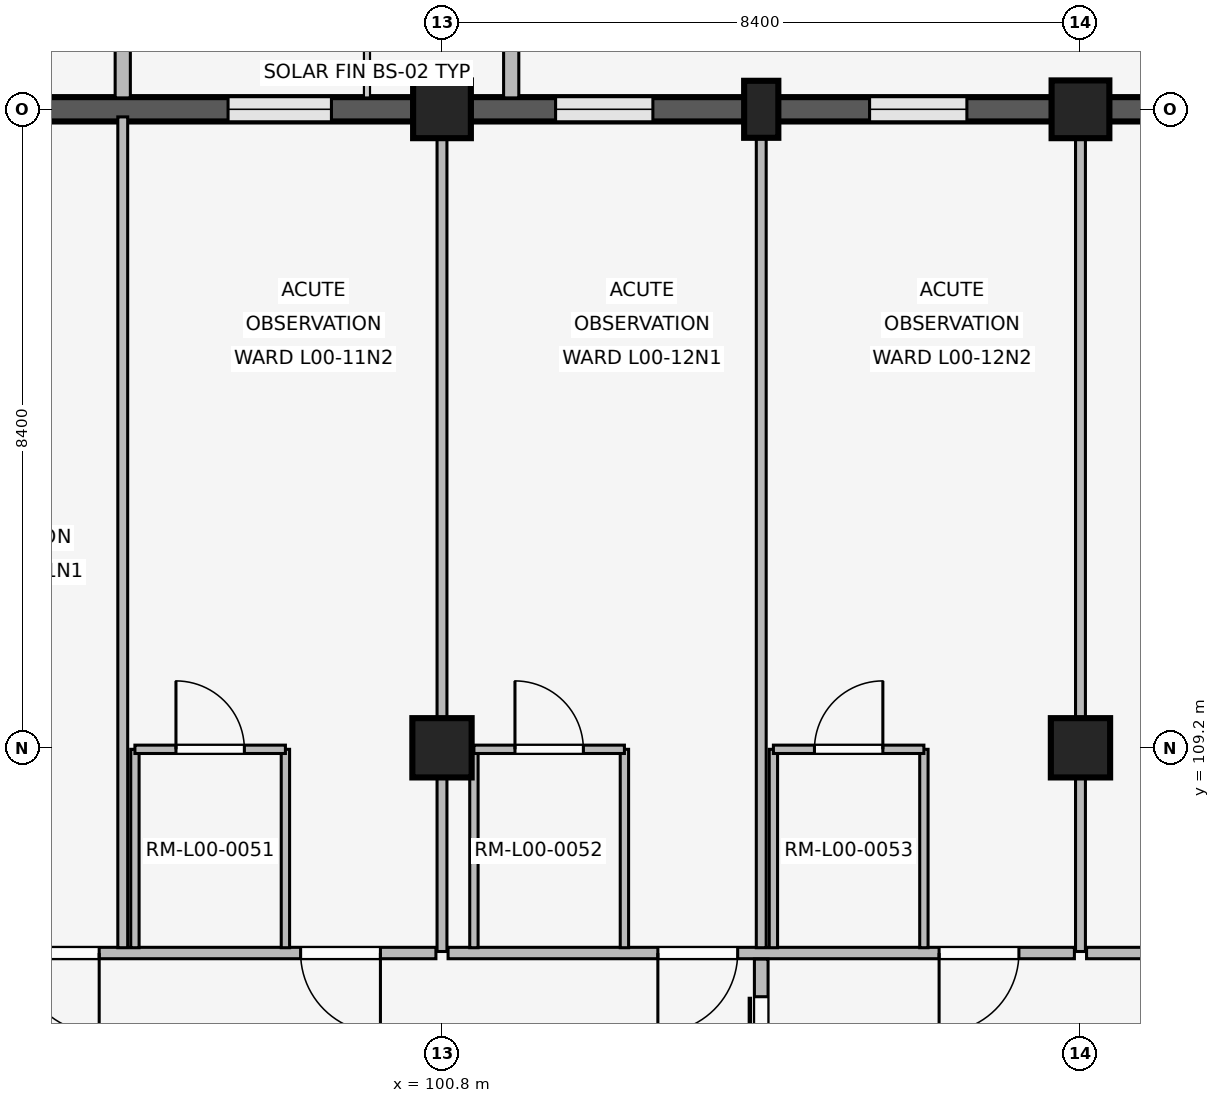
"""IFC4 building model, lengths in metres.
Left out: names, types, materials, properties, quantities, classifications, styles, units other than length and angle.
Written with IfcOpenShell. Run it as: python <this file> out.ifc"""

import sys

from ifc_helpers import new_model, si_unit, direction, frame, frame_2d, origin, origin_2d, place, context, subcontext, project, spatial, rectangle, extrude, element, fill, save


model = new_model("IFC4")
c1 = context("Model", 3, precision=1e-05, world=origin(), true_north=direction((0.0, 1.0)))
c2 = subcontext(c1, "Body", "Model", "MODEL_VIEW")
j1 = project(units=[si_unit("LENGTHUNIT", "METRE"), si_unit("PLANEANGLEUNIT", "RADIAN")], contexts=[c1])
p1 = place(None, origin())
s1 = spatial("IfcSite", under=j1, at=p1, CompositionType="ELEMENT")
p2 = place(p1, origin())
s2 = spatial("IfcBuilding", under=s1, at=p2, CompositionType="ELEMENT")
p3 = place(p2, origin())
s3 = spatial("IfcBuildingStorey", under=s2, at=p3, CompositionType="ELEMENT", Elevation=0.0)
p4 = place(p3, frame((100.8, 109.2, 0.0), z_axis=(0.0, 0.0, 1.0), x_axis=(1.0, 0.0, 0.0)))
e1 = element("IfcColumn", 1, at=p4, inside=s3, PredefinedType="COLUMN", context=c2, shape_type="SweptSolid", body=[
    extrude(rectangle(XDim=0.78, YDim=0.78, at=origin_2d()), origin(), (0.0, 0.0, 1.0), 4.8),
])
p5 = place(p3, frame((100.8, 117.6, 0.0), z_axis=(0.0, 0.0, 1.0), x_axis=(1.0, 0.0, 0.0)))
e2 = element("IfcColumn", 2, at=p5, inside=s3, PredefinedType="COLUMN", context=c2, shape_type="SweptSolid", body=[
    extrude(rectangle(XDim=0.76, YDim=0.76, at=origin_2d()), origin(), (0.0, 0.0, 1.0), 4.8),
])
p6 = place(p3, frame((109.2, 109.2, 0.0), z_axis=(0.0, 0.0, 1.0), x_axis=(1.0, 0.0, 0.0)))
e3 = element("IfcColumn", 3, at=p6, inside=s3, PredefinedType="COLUMN", context=c2, shape_type="SweptSolid", body=[
    extrude(rectangle(XDim=0.78, YDim=0.78, at=origin_2d()), origin(), (0.0, 0.0, 1.0), 4.8),
])
p7 = place(p3, frame((109.2, 117.6, 0.0), z_axis=(0.0, 0.0, 1.0), x_axis=(1.0, 0.0, 0.0)))
e4 = element("IfcColumn", 4, at=p7, inside=s3, PredefinedType="COLUMN", context=c2, shape_type="SweptSolid", body=[
    extrude(rectangle(XDim=0.76, YDim=0.76, at=origin_2d()), origin(), (0.0, 0.0, 1.0), 4.8),
])
p8 = place(p3, frame((105.0, 117.6, 0.0), z_axis=(0.0, 0.0, 1.0), x_axis=(1.0, 0.0, 0.0)))
e5 = element("IfcColumn", 5, at=p8, inside=s3, PredefinedType="PILASTER", context=c2, shape_type="SweptSolid", body=[
    extrude(rectangle(XDim=0.45, YDim=0.75, at=origin_2d()), origin(), (0.0, 0.0, 1.0), 4.8),
])
p9 = place(p3, frame((92.775, 117.6, 0.0), z_axis=(0.0, 0.0, 1.0), x_axis=(1.0, 0.0, 0.0)))
e6 = element("IfcWall", 6, at=p9, inside=s3, PredefinedType="SOLIDWALL", context=c2, shape_type="SweptSolid", body=[
    extrude(rectangle(XDim=7.65, YDim=0.32, at=frame_2d((3.825, 0.0))), origin(), (0.0, 0.0, 1.0), 3.82),
])
p10 = place(p9, frame((1.08, 0.0, 0.85)))
e7 = element("IfcOpeningElement", 7, at=p10, cuts=e6, PredefinedType="OPENING", context=c2, shape_type="SweptSolid", body=[
    extrude(rectangle(XDim=1.36, YDim=1.42, at=frame_2d((0.68, 0.71))), frame((0.0, 0.17, 0.0), z_axis=(0.0, -1.0, 0.0), x_axis=(1.0, 0.0, 0.0)), (0.0, 0.0, 1.0), 0.34),
])
p11 = place(p9, frame((5.21, 0.0, 0.85)))
e8 = element("IfcOpeningElement", 8, at=p11, cuts=e6, PredefinedType="OPENING", context=c2, shape_type="SweptSolid", body=[
    extrude(rectangle(XDim=1.36, YDim=1.42, at=frame_2d((0.68, 0.71))), frame((0.0, 0.17, 0.0), z_axis=(0.0, -1.0, 0.0), x_axis=(1.0, 0.0, 0.0)), (0.0, 0.0, 1.0), 0.34),
])
p12 = place(p3, frame((96.6, 117.75, 0.0), z_axis=(0.0, 0.0, 1.0), x_axis=(0.0, 1.0, 0.0)))
e9 = element("IfcWall", 9, at=p12, inside=s3, PredefinedType="ELEMENTEDWALL", context=c2, shape_type="SweptSolid", body=[
    extrude(rectangle(XDim=0.85, YDim=0.2, at=frame_2d((0.425, 0.0))), origin(), (0.0, 0.0, 1.0), 3.8),
])
p13 = place(p3, frame((101.175, 117.6, 0.0), z_axis=(0.0, 0.0, 1.0), x_axis=(1.0, 0.0, 0.0)))
e10 = element("IfcWall", 10, at=p13, inside=s3, PredefinedType="SOLIDWALL", context=c2, shape_type="SweptSolid", body=[
    extrude(rectangle(XDim=7.65, YDim=0.32, at=frame_2d((3.825, 0.0))), origin(), (0.0, 0.0, 1.0), 3.82),
])
p14 = place(p13, frame((1.119, 0.0, 0.85)))
e11 = element("IfcOpeningElement", 11, at=p14, cuts=e10, PredefinedType="OPENING", context=c2, shape_type="SweptSolid", body=[
    extrude(rectangle(XDim=1.28, YDim=1.38, at=frame_2d((0.64, 0.69))), frame((0.0, 0.17, 0.0), z_axis=(0.0, -1.0, 0.0), x_axis=(1.0, 0.0, 0.0)), (0.0, 0.0, 1.0), 0.34),
])
p15 = place(p13, frame((5.25, 0.0, 0.85)))
e12 = element("IfcOpeningElement", 12, at=p15, cuts=e10, PredefinedType="OPENING", context=c2, shape_type="SweptSolid", body=[
    extrude(rectangle(XDim=1.28, YDim=1.38, at=frame_2d((0.64, 0.69))), frame((0.0, 0.17, 0.0), z_axis=(0.0, -1.0, 0.0), x_axis=(1.0, 0.0, 0.0)), (0.0, 0.0, 1.0), 0.34),
])
p16 = place(p3, frame((101.71, 117.75, 0.0), z_axis=(0.0, 0.0, 1.0), x_axis=(0.0, 1.0, 0.0)))
e13 = element("IfcWall", 13, at=p16, inside=s3, PredefinedType="ELEMENTEDWALL", context=c2, shape_type="SweptSolid", body=[
    extrude(rectangle(XDim=0.85, YDim=0.2, at=frame_2d((0.425, 0.0))), origin(), (0.0, 0.0, 1.0), 3.8),
])
p17 = place(p3, frame((109.575, 117.6, 0.0), z_axis=(0.0, 0.0, 1.0), x_axis=(1.0, 0.0, 0.0)))
e14 = element("IfcWall", 14, at=p17, inside=s3, PredefinedType="SOLIDWALL", context=c2, shape_type="SweptSolid", body=[
    extrude(rectangle(XDim=7.65, YDim=0.32, at=frame_2d((3.825, 0.0))), origin(), (0.0, 0.0, 1.0), 3.82),
])
p18 = place(p17, frame((2.825, 0.0, 0.0)))
e15 = element("IfcOpeningElement", 15, at=p18, cuts=e14, PredefinedType="OPENING", context=c2, shape_type="SweptSolid", body=[
    extrude(rectangle(XDim=2.0, YDim=2.4, at=frame_2d((1.0, 1.2))), frame((0.0, 0.17, 0.0), z_axis=(0.0, -1.0, 0.0), x_axis=(1.0, 0.0, 0.0)), (0.0, 0.0, 1.0), 0.34),
])
p19 = place(p3, frame((100.72, 106.5, 0.0), z_axis=(0.0, 0.0, 1.0), x_axis=(-1.0, 0.0, 0.0)))
e16 = element("IfcWall", 16, at=p19, inside=s3, PredefinedType="PARTITIONING", context=c2, shape_type="SweptSolid", body=[
    extrude(rectangle(XDim=7.96, YDim=0.15, at=frame_2d((3.98, 0.0))), origin(), (0.0, 0.0, 1.0), 3.8),
])
p20 = place(p19, frame((0.73, 0.0, 0.0)))
e17 = element("IfcOpeningElement", 17, at=p20, cuts=e16, PredefinedType="OPENING", context=c2, shape_type="SweptSolid", body=[
    extrude(rectangle(XDim=1.05, YDim=2.2, at=frame_2d((0.525, 1.1))), frame((0.0, 0.085, 0.0), z_axis=(0.0, -1.0, 0.0), x_axis=(1.0, 0.0, 0.0)), (0.0, 0.0, 1.0), 0.17),
])
p21 = place(p19, frame((4.43, 0.0, 0.0)))
e18 = element("IfcOpeningElement", 18, at=p21, cuts=e16, PredefinedType="OPENING", context=c2, shape_type="SweptSolid", body=[
    extrude(rectangle(XDim=1.05, YDim=2.2, at=frame_2d((0.525, 1.1))), frame((0.0, 0.085, 0.0), z_axis=(0.0, -1.0, 0.0), x_axis=(1.0, 0.0, 0.0)), (0.0, 0.0, 1.0), 0.17),
])
p22 = place(p3, frame((96.6, 106.57, 0.0), z_axis=(0.0, 0.0, 1.0), x_axis=(0.0, 1.0, 0.0)))
e19 = element("IfcWall", 19, at=p22, inside=s3, PredefinedType="PARTITIONING", context=c2, shape_type="SweptSolid", body=[
    extrude(rectangle(XDim=10.93, YDim=0.13, at=frame_2d((5.465, 0.0))), origin(), (0.0, 0.0, 1.0), 3.8),
])
for number, where, z_axis, x_axis in (
    (20, (96.76, 106.57, 0.0), (0.0, 0.0, 1.0), (0.0, 1.0, 0.0)),
    (21, (98.74, 106.57, 0.0), (0.0, 0.0, 1.0), (0.0, 1.0, 0.0)),
):
    element("IfcWall", number, at=place(p3, frame(where, z_axis=z_axis, x_axis=x_axis)), inside=s3, PredefinedType="PARTITIONING", context=c2, shape_type="SweptSolid", body=[
        extrude(rectangle(XDim=2.61, YDim=0.11, at=frame_2d((1.305, 0.0))), origin(), (0.0, 0.0, 1.0), 3.8),
    ])
p23 = place(p3, frame((96.76, 109.18, 0.0), z_axis=(0.0, 0.0, 1.0), x_axis=(1.0, 0.0, 0.0)))
e22 = element("IfcWall", 22, at=p23, inside=s3, PredefinedType="PARTITIONING", context=c2, shape_type="SweptSolid", body=[
    extrude(rectangle(XDim=1.98, YDim=0.11, at=frame_2d((0.99, 0.0))), origin(), (0.0, 0.0, 1.0), 3.8),
])
p24 = place(p23, frame((0.54, 0.0, 0.0)))
e23 = element("IfcOpeningElement", 23, at=p24, cuts=e22, PredefinedType="OPENING", context=c2, shape_type="SweptSolid", body=[
    extrude(rectangle(XDim=0.9, YDim=2.1, at=frame_2d((0.45, 1.05))), frame((0.0, 0.065, 0.0), z_axis=(0.0, -1.0, 0.0), x_axis=(1.0, 0.0, 0.0)), (0.0, 0.0, 1.0), 0.13),
])
p25 = place(p3, frame((100.8, 106.52, 0.0), z_axis=(0.0, 0.0, 1.0), x_axis=(0.0, 1.0, 0.0)))
e24 = element("IfcWall", 24, at=p25, inside=s3, PredefinedType="PARTITIONING", context=c2, shape_type="SweptSolid", body=[
    extrude(rectangle(XDim=10.94, YDim=0.13, at=frame_2d((5.47, 0.0))), origin(), (0.0, 0.0, 1.0), 3.8),
])
p26 = place(p3, frame((109.12, 106.5, 0.0), z_axis=(0.0, 0.0, 1.0), x_axis=(-1.0, 0.0, 0.0)))
e25 = element("IfcWall", 25, at=p26, inside=s3, PredefinedType="PARTITIONING", context=c2, shape_type="SweptSolid", body=[
    extrude(rectangle(XDim=8.24, YDim=0.15, at=frame_2d((4.12, 0.0))), origin(), (0.0, 0.0, 1.0), 3.8),
])
p27 = place(p26, frame((0.73, 0.0, 0.0)))
e26 = element("IfcOpeningElement", 26, at=p27, cuts=e25, PredefinedType="OPENING", context=c2, shape_type="SweptSolid", body=[
    extrude(rectangle(XDim=1.05, YDim=2.2, at=frame_2d((0.525, 1.1))), frame((0.0, 0.085, 0.0), z_axis=(0.0, -1.0, 0.0), x_axis=(1.0, 0.0, 0.0)), (0.0, 0.0, 1.0), 0.17),
])
p28 = place(p26, frame((4.43, 0.0, 0.0)))
e27 = element("IfcOpeningElement", 27, at=p28, cuts=e25, PredefinedType="OPENING", context=c2, shape_type="SweptSolid", body=[
    extrude(rectangle(XDim=1.05, YDim=2.2, at=frame_2d((0.525, 1.1))), frame((0.0, 0.085, 0.0), z_axis=(0.0, -1.0, 0.0), x_axis=(1.0, 0.0, 0.0)), (0.0, 0.0, 1.0), 0.17),
])
p29 = place(p3, frame((105.0, 106.57, 0.0), z_axis=(0.0, 0.0, 1.0), x_axis=(0.0, 1.0, 0.0)))
e28 = element("IfcWall", 28, at=p29, inside=s3, PredefinedType="PARTITIONING", context=c2, shape_type="SweptSolid", body=[
    extrude(rectangle(XDim=10.93, YDim=0.13, at=frame_2d((5.465, 0.0))), origin(), (0.0, 0.0, 1.0), 3.8),
])
for number, where, z_axis, x_axis in (
    (29, (101.22, 106.57, 0.0), (0.0, 0.0, 1.0), (0.0, 1.0, 0.0)),
    (30, (103.2, 106.57, 0.0), (0.0, 0.0, 1.0), (0.0, 1.0, 0.0)),
):
    element("IfcWall", number, at=place(p3, frame(where, z_axis=z_axis, x_axis=x_axis)), inside=s3, PredefinedType="PARTITIONING", context=c2, shape_type="SweptSolid", body=[
        extrude(rectangle(XDim=2.61, YDim=0.11, at=frame_2d((1.305, 0.0))), origin(), (0.0, 0.0, 1.0), 3.8),
    ])
p30 = place(p3, frame((101.22, 109.18, 0.0), z_axis=(0.0, 0.0, 1.0), x_axis=(1.0, 0.0, 0.0)))
e31 = element("IfcWall", 31, at=p30, inside=s3, PredefinedType="PARTITIONING", context=c2, shape_type="SweptSolid", body=[
    extrude(rectangle(XDim=1.98, YDim=0.11, at=frame_2d((0.99, 0.0))), origin(), (0.0, 0.0, 1.0), 3.8),
])
p31 = place(p30, frame((0.54, 0.0, 0.0)))
e32 = element("IfcOpeningElement", 32, at=p31, cuts=e31, PredefinedType="OPENING", context=c2, shape_type="SweptSolid", body=[
    extrude(rectangle(XDim=0.9, YDim=2.1, at=frame_2d((0.45, 1.05))), frame((0.0, 0.065, 0.0), z_axis=(0.0, -1.0, 0.0), x_axis=(1.0, 0.0, 0.0)), (0.0, 0.0, 1.0), 0.13),
])
for number, where, z_axis, x_axis in (
    (33, (105.16, 106.57, 0.0), (0.0, 0.0, 1.0), (0.0, 1.0, 0.0)),
    (34, (107.14, 106.57, 0.0), (0.0, 0.0, 1.0), (0.0, 1.0, 0.0)),
):
    element("IfcWall", number, at=place(p3, frame(where, z_axis=z_axis, x_axis=x_axis)), inside=s3, PredefinedType="PARTITIONING", context=c2, shape_type="SweptSolid", body=[
        extrude(rectangle(XDim=2.61, YDim=0.11, at=frame_2d((1.305, 0.0))), origin(), (0.0, 0.0, 1.0), 3.8),
    ])
p32 = place(p3, frame((105.16, 109.18, 0.0), z_axis=(0.0, 0.0, 1.0), x_axis=(1.0, 0.0, 0.0)))
e35 = element("IfcWall", 35, at=p32, inside=s3, PredefinedType="PARTITIONING", context=c2, shape_type="SweptSolid", body=[
    extrude(rectangle(XDim=1.98, YDim=0.11, at=frame_2d((0.99, 0.0))), origin(), (0.0, 0.0, 1.0), 3.8),
])
p33 = place(p32, frame((0.54, 0.0, 0.0)))
e36 = element("IfcOpeningElement", 36, at=p33, cuts=e35, PredefinedType="OPENING", context=c2, shape_type="SweptSolid", body=[
    extrude(rectangle(XDim=0.9, YDim=2.1, at=frame_2d((0.45, 1.05))), frame((0.0, 0.065, 0.0), z_axis=(0.0, -1.0, 0.0), x_axis=(1.0, 0.0, 0.0)), (0.0, 0.0, 1.0), 0.13),
])
p34 = place(p3, frame((105.0, 103.58, 0.0), z_axis=(0.0, 0.0, 1.0), x_axis=(0.0, 1.0, 0.0)))
e37 = element("IfcWall", 37, at=p34, inside=s3, PredefinedType="PARTITIONING", context=c2, shape_type="SweptSolid", body=[
    extrude(rectangle(XDim=2.84, YDim=0.18, at=frame_2d((1.42, 0.0))), origin(), (0.0, 0.0, 1.0), 3.8),
])
p35 = place(p34, frame((0.495, 0.0, 0.0)))
e38 = element("IfcOpeningElement", 38, at=p35, cuts=e37, PredefinedType="OPENING", context=c2, shape_type="SweptSolid", body=[
    extrude(rectangle(XDim=1.85, YDim=2.3, at=frame_2d((0.925, 1.15))), frame((0.0, 0.1, 0.0), z_axis=(0.0, -1.0, 0.0), x_axis=(1.0, 0.0, 0.0)), (0.0, 0.0, 1.0), 0.2),
])
p36 = place(p3, frame((109.2, 106.52, 0.0), z_axis=(0.0, 0.0, 1.0), x_axis=(0.0, 1.0, 0.0)))
e39 = element("IfcWall", 39, at=p36, inside=s3, PredefinedType="PARTITIONING", context=c2, shape_type="SweptSolid", body=[
    extrude(rectangle(XDim=10.94, YDim=0.13, at=frame_2d((5.47, 0.0))), origin(), (0.0, 0.0, 1.0), 3.8),
])
p37 = place(p3, frame((117.52, 106.5, 0.0), z_axis=(0.0, 0.0, 1.0), x_axis=(-1.0, 0.0, 0.0)))
e40 = element("IfcWall", 40, at=p37, inside=s3, PredefinedType="PARTITIONING", context=c2, shape_type="SweptSolid", body=[
    extrude(rectangle(XDim=8.24, YDim=0.15, at=frame_2d((4.12, 0.0))), origin(), (0.0, 0.0, 1.0), 3.8),
])
p38 = place(p37, frame((3.545, 0.0, 0.0)))
e41 = element("IfcOpeningElement", 41, at=p38, cuts=e40, PredefinedType="OPENING", context=c2, shape_type="SweptSolid", body=[
    extrude(rectangle(XDim=1.15, YDim=2.2, at=frame_2d((0.575, 1.1))), frame((0.0, 0.085, 0.0), z_axis=(0.0, -1.0, 0.0), x_axis=(1.0, 0.0, 0.0)), (0.0, 0.0, 1.0), 0.17),
])
p39 = place(p11, origin())
e42 = element("IfcWindow", 42, at=p39, inside=s3, PartitioningType="SINGLE_PANEL", PredefinedType="WINDOW", context=c2, shape_type="SweptSolid", body=[
    extrude(rectangle(XDim=1.36, YDim=1.42, at=frame_2d((0.68, 0.71))), frame((0.0, 0.03, 0.0), z_axis=(0.0, -1.0, 0.0), x_axis=(1.0, 0.0, 0.0)), (0.0, 0.0, 1.0), 0.06),
])
fill(e8, e42)
p40 = place(p14, origin())
e43 = element("IfcWindow", 43, at=p40, inside=s3, PartitioningType="SINGLE_PANEL", PredefinedType="WINDOW", context=c2, shape_type="SweptSolid", body=[
    extrude(rectangle(XDim=1.28, YDim=1.38, at=frame_2d((0.64, 0.69))), frame((0.0, 0.03, 0.0), z_axis=(0.0, -1.0, 0.0), x_axis=(1.0, 0.0, 0.0)), (0.0, 0.0, 1.0), 0.06),
])
fill(e11, e43)
p41 = place(p15, origin())
e44 = element("IfcWindow", 44, at=p41, inside=s3, PartitioningType="SINGLE_PANEL", PredefinedType="WINDOW", context=c2, shape_type="SweptSolid", body=[
    extrude(rectangle(XDim=1.28, YDim=1.38, at=frame_2d((0.64, 0.69))), frame((0.0, 0.03, 0.0), z_axis=(0.0, -1.0, 0.0), x_axis=(1.0, 0.0, 0.0)), (0.0, 0.0, 1.0), 0.06),
])
fill(e12, e44)
p42 = place(p20, origin())
e45 = element("IfcDoor", 45, at=p42, inside=s3, OperationType="SINGLE_SWING_LEFT", PredefinedType="DOOR", context=c2, shape_type="SweptSolid", body=[
    extrude(rectangle(XDim=1.05, YDim=2.2, at=frame_2d((0.525, 1.1))), frame((0.0, 0.025, 0.0), z_axis=(0.0, -1.0, 0.0), x_axis=(1.0, 0.0, 0.0)), (0.0, 0.0, 1.0), 0.05),
])
fill(e17, e45)
p43 = place(p21, origin())
e46 = element("IfcDoor", 46, at=p43, inside=s3, OperationType="SINGLE_SWING_LEFT", PredefinedType="DOOR", context=c2, shape_type="SweptSolid", body=[
    extrude(rectangle(XDim=1.05, YDim=2.2, at=frame_2d((0.525, 1.1))), frame((0.0, 0.025, 0.0), z_axis=(0.0, -1.0, 0.0), x_axis=(1.0, 0.0, 0.0)), (0.0, 0.0, 1.0), 0.05),
])
fill(e18, e46)
p44 = place(p24, origin())
e47 = element("IfcDoor", 47, at=p44, inside=s3, OperationType="SINGLE_SWING_LEFT", PredefinedType="DOOR", context=c2, shape_type="SweptSolid", body=[
    extrude(rectangle(XDim=0.9, YDim=2.1, at=frame_2d((0.45, 1.05))), frame((0.0, 0.025, 0.0), z_axis=(0.0, -1.0, 0.0), x_axis=(1.0, 0.0, 0.0)), (0.0, 0.0, 1.0), 0.05),
])
fill(e23, e47)
p45 = place(p27, origin())
e48 = element("IfcDoor", 48, at=p45, inside=s3, OperationType="SINGLE_SWING_RIGHT", PredefinedType="DOOR", context=c2, shape_type="SweptSolid", body=[
    extrude(rectangle(XDim=1.05, YDim=2.2, at=frame_2d((0.525, 1.1))), frame((0.0, 0.025, 0.0), z_axis=(0.0, -1.0, 0.0), x_axis=(1.0, 0.0, 0.0)), (0.0, 0.0, 1.0), 0.05),
])
fill(e26, e48)
p46 = place(p28, origin())
e49 = element("IfcDoor", 49, at=p46, inside=s3, OperationType="SINGLE_SWING_RIGHT", PredefinedType="DOOR", context=c2, shape_type="SweptSolid", body=[
    extrude(rectangle(XDim=1.05, YDim=2.2, at=frame_2d((0.525, 1.1))), frame((0.0, 0.025, 0.0), z_axis=(0.0, -1.0, 0.0), x_axis=(1.0, 0.0, 0.0)), (0.0, 0.0, 1.0), 0.05),
])
fill(e27, e49)
p47 = place(p31, origin())
e50 = element("IfcDoor", 50, at=p47, inside=s3, OperationType="SINGLE_SWING_LEFT", PredefinedType="DOOR", context=c2, shape_type="SweptSolid", body=[
    extrude(rectangle(XDim=0.9, YDim=2.1, at=frame_2d((0.45, 1.05))), frame((0.0, 0.025, 0.0), z_axis=(0.0, -1.0, 0.0), x_axis=(1.0, 0.0, 0.0)), (0.0, 0.0, 1.0), 0.05),
])
fill(e32, e50)
p48 = place(p33, origin())
e51 = element("IfcDoor", 51, at=p48, inside=s3, OperationType="SINGLE_SWING_RIGHT", PredefinedType="DOOR", context=c2, shape_type="SweptSolid", body=[
    extrude(rectangle(XDim=0.9, YDim=2.1, at=frame_2d((0.45, 1.05))), frame((0.0, 0.025, 0.0), z_axis=(0.0, -1.0, 0.0), x_axis=(1.0, 0.0, 0.0)), (0.0, 0.0, 1.0), 0.05),
])
fill(e36, e51)
p49 = place(p35, origin())
e52 = element("IfcDoor", 52, at=p49, inside=s3, OperationType="SLIDING_TO_LEFT", PredefinedType="DOOR", context=c2, shape_type="SweptSolid", body=[
    extrude(rectangle(XDim=1.85, YDim=2.3, at=frame_2d((0.925, 1.15))), frame((0.0, 0.025, 0.0), z_axis=(0.0, -1.0, 0.0), x_axis=(1.0, 0.0, 0.0)), (0.0, 0.0, 1.0), 0.05),
])
fill(e38, e52)
save(model, sys.argv[1])
